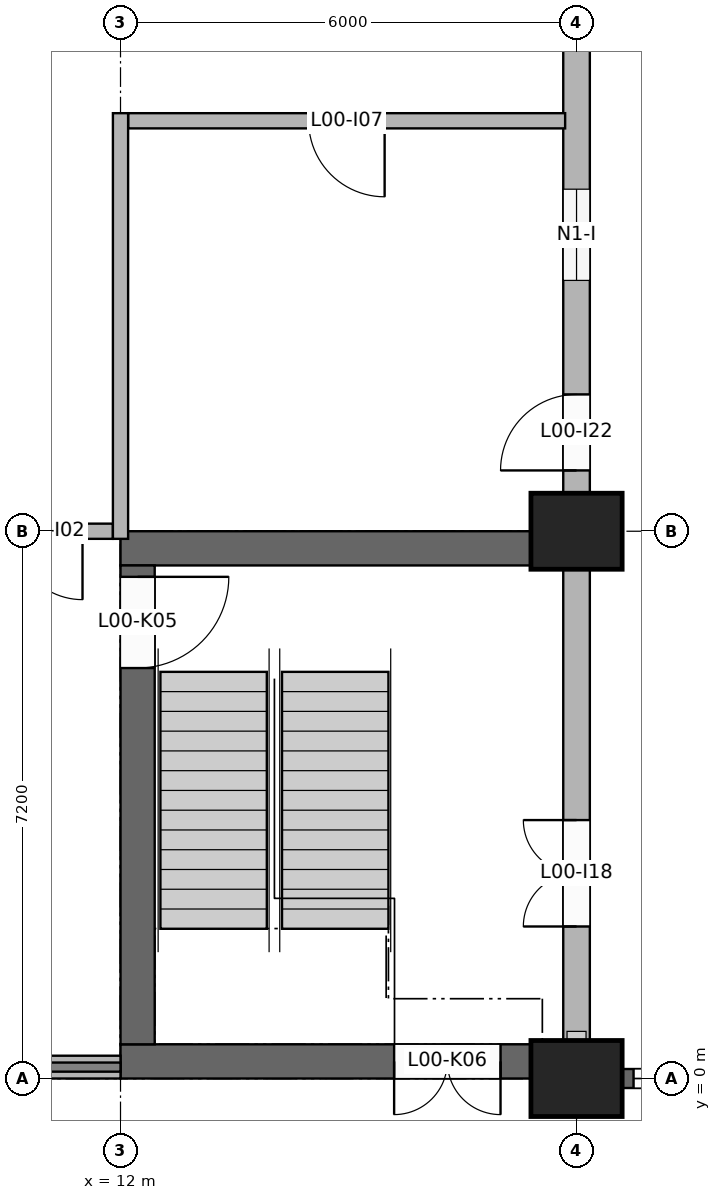
"""IFC4 building model, lengths in metres.
Left out: names, types, materials, properties, quantities, classifications, styles, units other than length and angle.
Written with IfcOpenShell. Run it as: python <this file> out.ifc"""

import sys

from ifc_helpers import new_model, si_unit, direction, frame, frame_2d, origin, origin_2d, place, context, subcontext, project, spatial, rectangle, extrude, element, fill, save


model = new_model("IFC4")
c1 = context("Model", 3, precision=1e-05, world=origin(), true_north=direction((0.0, 1.0)))
c2 = subcontext(c1, "Body", "Model", "MODEL_VIEW")
j1 = project(units=[si_unit("LENGTHUNIT", "METRE"), si_unit("PLANEANGLEUNIT", "RADIAN")], contexts=[c1])
p1 = place(None, origin())
s1 = spatial("IfcSite", under=j1, at=p1, CompositionType="ELEMENT")
p2 = place(p1, origin())
s2 = spatial("IfcBuilding", under=s1, at=p2, CompositionType="ELEMENT")
p3 = place(p2, origin())
s3 = spatial("IfcBuildingStorey", under=s2, at=p3, CompositionType="ELEMENT", Elevation=0.0)
p4 = place(p3, frame((12.0, 0.225, 0.0), z_axis=(0.0, 0.0, 1.0), x_axis=(1.0, 0.0, 0.0)))
e1 = element("IfcWall", 1, at=p4, inside=s3, PredefinedType="SHEAR", context=c2, shape_type="SweptSolid", body=[
    extrude(rectangle(XDim=5.4, YDim=0.45, at=frame_2d((2.7, 0.0))), origin(), (0.0, 0.0, 1.0), 4.0),
])
p5 = place(p4, frame((3.6, 0.0, 0.0)))
e2 = element("IfcOpeningElement", 2, at=p5, cuts=e1, PredefinedType="OPENING", context=c2, shape_type="SweptSolid", body=[
    extrude(rectangle(XDim=1.4, YDim=2.1, at=frame_2d((0.7, 1.05))), frame((0.0, 0.235, 0.0), z_axis=(0.0, -1.0, 0.0), x_axis=(1.0, 0.0, 0.0)), (0.0, 0.0, 1.0), 0.47),
])
p6 = place(p3, frame((12.0, 6.975, 0.0), z_axis=(0.0, 0.0, 1.0), x_axis=(1.0, 0.0, 0.0)))
e3 = element("IfcWall", 3, at=p6, inside=s3, PredefinedType="SHEAR", context=c2, shape_type="SweptSolid", body=[
    extrude(rectangle(XDim=5.4, YDim=0.45, at=frame_2d((2.7, 0.0))), origin(), (0.0, 0.0, 1.0), 4.0),
])
p7 = place(p3, frame((12.225, 0.45, 0.0), z_axis=(0.0, 0.0, 1.0), x_axis=(0.0, 1.0, 0.0)))
e4 = element("IfcWall", 4, at=p7, inside=s3, PredefinedType="SHEAR", context=c2, shape_type="SweptSolid", body=[
    extrude(rectangle(XDim=6.3, YDim=0.45, at=frame_2d((3.15, 0.0))), origin(), (0.0, 0.0, 1.0), 4.0),
])
p8 = place(p7, frame((4.95, 0.0, 0.0)))
e5 = element("IfcOpeningElement", 5, at=p8, cuts=e4, PredefinedType="OPENING", context=c2, shape_type="SweptSolid", body=[
    extrude(rectangle(XDim=1.2, YDim=2.1, at=frame_2d((0.6, 1.05))), frame((0.0, 0.235, 0.0), z_axis=(0.0, -1.0, 0.0), x_axis=(1.0, 0.0, 0.0)), (0.0, 0.0, 1.0), 0.47),
])
for number, where, z_axis, x_axis in (
    (6, (18.0, 0.0, -0.25), (0.0, 0.0, 1.0), (1.0, 0.0, 0.0)),
    (7, (18.0, 7.2, -0.25), (0.0, 0.0, 1.0), (1.0, 0.0, 0.0)),
):
    element("IfcColumn", number, at=place(p3, frame(where, z_axis=z_axis, x_axis=x_axis)), inside=s3, PredefinedType="COLUMN", context=c2, shape_type="SweptSolid", body=[
        extrude(rectangle(XDim=1.2, YDim=1.0, at=origin_2d()), origin(), (0.0, 0.0, 1.0), 4.45),
    ])
p9 = place(p3, frame((18.0, 0.5, 0.0), z_axis=(0.0, 0.0, 1.0), x_axis=(0.0, 1.0, 0.0)))
e8 = element("IfcWall", 8, at=p9, inside=s3, PredefinedType="SOLIDWALL", context=c2, shape_type="SweptSolid", body=[
    extrude(rectangle(XDim=6.2, YDim=0.35, at=frame_2d((3.1, 0.0))), origin(), (0.0, 0.0, 1.0), 4.2),
])
p10 = place(p9, frame((1.5, 0.0, 0.0)))
e9 = element("IfcOpeningElement", 9, at=p10, cuts=e8, PredefinedType="OPENING", context=c2, shape_type="SweptSolid", body=[
    extrude(rectangle(XDim=1.4, YDim=2.1, at=frame_2d((0.7, 1.05))), frame((0.0, 0.185, 0.0), z_axis=(0.0, -1.0, 0.0), x_axis=(1.0, 0.0, 0.0)), (0.0, 0.0, 1.0), 0.37),
])
p11 = place(p3, frame((18.0, 7.7, 0.0), z_axis=(0.0, 0.0, 1.0), x_axis=(0.0, 1.0, 0.0)))
e10 = element("IfcWall", 10, at=p11, inside=s3, PredefinedType="SOLIDWALL", context=c2, shape_type="SweptSolid", body=[
    extrude(rectangle(XDim=6.2, YDim=0.35, at=frame_2d((3.1, 0.0))), origin(), (0.0, 0.0, 1.0), 4.2),
])
p12 = place(p11, frame((0.3, 0.0, 0.0)))
e11 = element("IfcOpeningElement", 11, at=p12, cuts=e10, PredefinedType="OPENING", context=c2, shape_type="SweptSolid", body=[
    extrude(rectangle(XDim=1.0, YDim=2.1, at=frame_2d((0.5, 1.05))), frame((0.0, 0.185, 0.0), z_axis=(0.0, -1.0, 0.0), x_axis=(1.0, 0.0, 0.0)), (0.0, 0.0, 1.0), 0.37),
])
p13 = place(p11, frame((2.8, 0.0, 0.9)))
e12 = element("IfcOpeningElement", 12, at=p13, cuts=e10, PredefinedType="OPENING", context=c2, shape_type="SweptSolid", body=[
    extrude(rectangle(XDim=1.2, YDim=1.2, at=frame_2d((0.6, 0.6))), frame((0.0, 0.185, 0.0), z_axis=(0.0, -1.0, 0.0), x_axis=(1.0, 0.0, 0.0)), (0.0, 0.0, 1.0), 0.37),
])
p14 = place(p3, frame((18.6, 0.0, 0.0), z_axis=(0.0, 0.0, 1.0), x_axis=(1.0, 0.0, 0.0)))
e13 = element("IfcWall", 13, at=p14, inside=s3, PredefinedType="SOLIDWALL", context=c2, shape_type="SweptSolid", body=[
    extrude(rectangle(XDim=4.8, YDim=0.25, at=frame_2d((2.4, 0.0))), origin(), (0.0, 0.0, 1.0), 5.4),
])
p15 = place(p14, frame((0.15, 0.0, 0.0)))
e14 = element("IfcOpeningElement", 14, at=p15, cuts=e13, PredefinedType="OPENING", context=c2, shape_type="SweptSolid", body=[
    extrude(rectangle(XDim=4.5, YDim=4.8, at=frame_2d((2.25, 2.4))), frame((0.0, 0.135, 0.0), z_axis=(0.0, -1.0, 0.0), x_axis=(1.0, 0.0, 0.0)), (0.0, 0.0, 1.0), 0.27),
])
p16 = place(p3, frame((6.4, 0.15, 0.0), z_axis=(0.0, 0.0, 1.0), x_axis=(1.0, 0.0, 0.0)))
e15 = element("IfcWall", 15, at=p16, inside=s3, PredefinedType="SOLIDWALL", context=c2, shape_type="SweptSolid", body=[
    extrude(rectangle(XDim=5.6, YDim=0.3, at=frame_2d((2.8, 0.0))), origin(), (0.0, 0.0, 1.0), 2.6),
])
p17 = place(p16, frame((0.95, 0.0, 0.0)))
e16 = element("IfcOpeningElement", 16, at=p17, cuts=e15, PredefinedType="OPENING", context=c2, shape_type="SweptSolid", body=[
    extrude(rectangle(XDim=1.6, YDim=2.4, at=frame_2d((0.8, 1.2))), frame((0.0, 0.16, 0.0), z_axis=(0.0, -1.0, 0.0), x_axis=(1.0, 0.0, 0.0)), (0.0, 0.0, 1.0), 0.32),
])
p18 = place(p16, frame((3.05, 0.0, 0.0)))
e17 = element("IfcOpeningElement", 17, at=p18, cuts=e15, PredefinedType="OPENING", context=c2, shape_type="SweptSolid", body=[
    extrude(rectangle(XDim=1.6, YDim=2.4, at=frame_2d((0.8, 1.2))), frame((0.0, 0.16, 0.0), z_axis=(0.0, -1.0, 0.0), x_axis=(1.0, 0.0, 0.0)), (0.0, 0.0, 1.0), 0.32),
])
p19 = place(p3, frame((12.0, 7.1, 0.0), z_axis=(0.0, 0.0, 1.0), x_axis=(0.0, 1.0, 0.0)))
e18 = element("IfcWall", 18, at=p19, inside=s3, PredefinedType="PARTITIONING", context=c2, shape_type="SweptSolid", body=[
    extrude(rectangle(XDim=5.6, YDim=0.2, at=frame_2d((2.8, 0.0))), origin(), (0.0, 0.0, 1.0), 3.1),
])
p20 = place(p3, frame((6.4, 7.2, 0.0), z_axis=(0.0, 0.0, 1.0), x_axis=(1.0, 0.0, 0.0)))
e19 = element("IfcWall", 19, at=p20, inside=s3, PredefinedType="PARTITIONING", context=c2, shape_type="SweptSolid", body=[
    extrude(rectangle(XDim=5.5, YDim=0.2, at=frame_2d((2.75, 0.0))), origin(), (0.0, 0.0, 1.0), 3.1),
])
p21 = place(p20, frame((4.2, 0.0, 0.0)))
e20 = element("IfcOpeningElement", 20, at=p21, cuts=e19, PredefinedType="OPENING", context=c2, shape_type="SweptSolid", body=[
    extrude(rectangle(XDim=0.9, YDim=2.1, at=frame_2d((0.45, 1.05))), frame((0.0, 0.11, 0.0), z_axis=(0.0, -1.0, 0.0), x_axis=(1.0, 0.0, 0.0)), (0.0, 0.0, 1.0), 0.22),
])
p22 = place(p3, frame((12.1, 12.6, 0.0), z_axis=(0.0, 0.0, 1.0), x_axis=(1.0, 0.0, 0.0)))
e21 = element("IfcWall", 21, at=p22, inside=s3, PredefinedType="PARTITIONING", context=c2, shape_type="SweptSolid", body=[
    extrude(rectangle(XDim=5.75, YDim=0.2, at=frame_2d((2.875, 0.0))), origin(), (0.0, 0.0, 1.0), 3.1),
])
p23 = place(p22, frame((2.375, 0.0, 0.0)))
e22 = element("IfcOpeningElement", 22, at=p23, cuts=e21, PredefinedType="OPENING", context=c2, shape_type="SweptSolid", body=[
    extrude(rectangle(XDim=1.0, YDim=2.1, at=frame_2d((0.5, 1.05))), frame((0.0, 0.11, 0.0), z_axis=(0.0, -1.0, 0.0), x_axis=(1.0, 0.0, 0.0)), (0.0, 0.0, 1.0), 0.22),
])
p24 = place(p15, frame((4.5, 0.0, 0.0), z_axis=(0.0, 0.0, 1.0), x_axis=(-1.0, 0.0, 0.0)))
e23 = element("IfcDoor", 23, at=p24, inside=s3, OperationType="ROLLINGUP", PredefinedType="DOOR", context=c2, shape_type="SweptSolid", body=[
    extrude(rectangle(XDim=4.5, YDim=4.8, at=frame_2d((2.25, 2.4))), frame((0.0, 0.025, 0.0), z_axis=(0.0, -1.0, 0.0), x_axis=(1.0, 0.0, 0.0)), (0.0, 0.0, 1.0), 0.05),
])
fill(e14, e23)
p25 = place(p8, frame((1.2, 0.0, 0.0), z_axis=(0.0, 0.0, 1.0), x_axis=(-1.0, 0.0, 0.0)))
e24 = element("IfcDoor", 24, at=p25, inside=s3, OperationType="SINGLE_SWING_LEFT", PredefinedType="DOOR", context=c2, shape_type="SweptSolid", body=[
    extrude(rectangle(XDim=1.2, YDim=2.1, at=frame_2d((0.6, 1.05))), frame((0.0, 0.025, 0.0), z_axis=(0.0, -1.0, 0.0), x_axis=(1.0, 0.0, 0.0)), (0.0, 0.0, 1.0), 0.05),
])
fill(e5, e24)
p26 = place(p5, frame((1.4, 0.0, 0.0), z_axis=(0.0, 0.0, 1.0), x_axis=(-1.0, 0.0, 0.0)))
e25 = element("IfcDoor", 25, at=p26, inside=s3, OperationType="DOUBLE_DOOR_SINGLE_SWING", PredefinedType="DOOR", context=c2, shape_type="SweptSolid", body=[
    extrude(rectangle(XDim=1.4, YDim=2.1, at=frame_2d((0.7, 1.05))), frame((0.0, 0.025, 0.0), z_axis=(0.0, -1.0, 0.0), x_axis=(1.0, 0.0, 0.0)), (0.0, 0.0, 1.0), 0.05),
])
fill(e2, e25)
p27 = place(p21, frame((0.9, 0.0, 0.0), z_axis=(0.0, 0.0, 1.0), x_axis=(-1.0, 0.0, 0.0)))
e26 = element("IfcDoor", 26, at=p27, inside=s3, OperationType="SINGLE_SWING_LEFT", PredefinedType="DOOR", context=c2, shape_type="SweptSolid", body=[
    extrude(rectangle(XDim=0.9, YDim=2.1, at=frame_2d((0.45, 1.05))), frame((0.0, 0.025, 0.0), z_axis=(0.0, -1.0, 0.0), x_axis=(1.0, 0.0, 0.0)), (0.0, 0.0, 1.0), 0.05),
])
fill(e20, e26)
p28 = place(p23, frame((1.0, 0.0, 0.0), z_axis=(0.0, 0.0, 1.0), x_axis=(-1.0, 0.0, 0.0)))
e27 = element("IfcDoor", 27, at=p28, inside=s3, OperationType="SINGLE_SWING_LEFT", PredefinedType="DOOR", context=c2, shape_type="SweptSolid", body=[
    extrude(rectangle(XDim=1.0, YDim=2.1, at=frame_2d((0.5, 1.05))), frame((0.0, 0.025, 0.0), z_axis=(0.0, -1.0, 0.0), x_axis=(1.0, 0.0, 0.0)), (0.0, 0.0, 1.0), 0.05),
])
fill(e22, e27)
p29 = place(p10, origin())
e28 = element("IfcDoor", 28, at=p29, inside=s3, OperationType="DOUBLE_DOOR_DOUBLE_SWING", PredefinedType="DOOR", context=c2, shape_type="SweptSolid", body=[
    extrude(rectangle(XDim=1.4, YDim=2.1, at=frame_2d((0.7, 1.05))), frame((0.0, 0.025, 0.0), z_axis=(0.0, -1.0, 0.0), x_axis=(1.0, 0.0, 0.0)), (0.0, 0.0, 1.0), 0.05),
])
fill(e9, e28)
p30 = place(p12, origin())
e29 = element("IfcDoor", 29, at=p30, inside=s3, OperationType="SINGLE_SWING_LEFT", PredefinedType="DOOR", context=c2, shape_type="SweptSolid", body=[
    extrude(rectangle(XDim=1.0, YDim=2.1, at=frame_2d((0.5, 1.05))), frame((0.0, 0.025, 0.0), z_axis=(0.0, -1.0, 0.0), x_axis=(1.0, 0.0, 0.0)), (0.0, 0.0, 1.0), 0.05),
])
fill(e11, e29)
p31 = place(p13, origin())
e30 = element("IfcWindow", 30, at=p31, inside=s3, PartitioningType="SINGLE_PANEL", PredefinedType="WINDOW", context=c2, shape_type="SweptSolid", body=[
    extrude(rectangle(XDim=1.2, YDim=1.2, at=frame_2d((0.6, 0.6))), frame((0.0, 0.03, 0.0), z_axis=(0.0, -1.0, 0.0), x_axis=(1.0, 0.0, 0.0)), (0.0, 0.0, 1.0), 0.06),
])
fill(e12, e30)
save(model, sys.argv[1])
